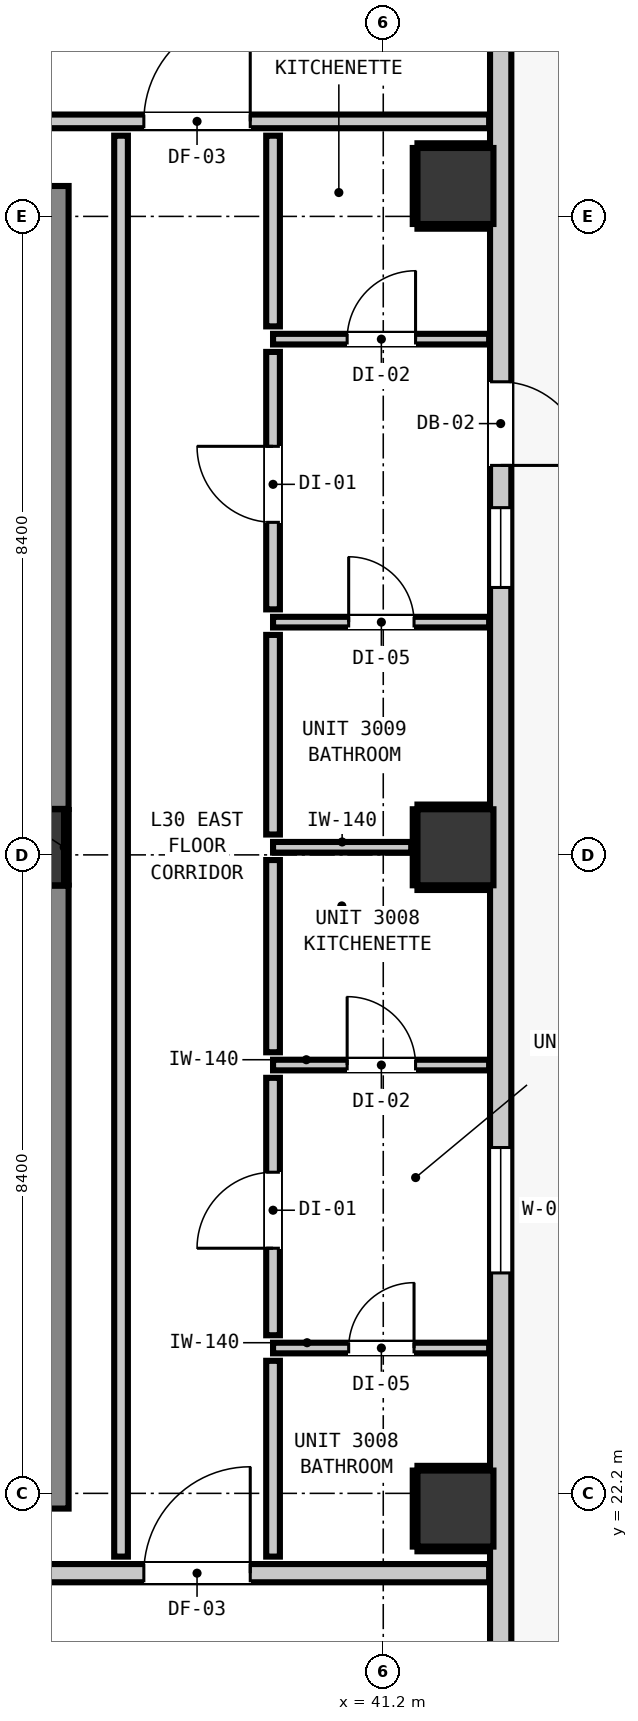
"""IFC4 building model, lengths in metres.
Left out: names, types, materials, properties, quantities, classifications, styles, units other than length and angle.
Written with IfcOpenShell. Run it as: python <this file> out.ifc"""

import sys

from ifc_helpers import new_model, si_unit, direction, frame, frame_2d, origin, origin_2d, place, context, subcontext, project, spatial, rectangle, extrude, element, fill, save


model = new_model("IFC4")
c1 = context("Model", 3, precision=1e-05, world=origin(), true_north=direction((0.0, 1.0)))
c2 = subcontext(c1, "Body", "Model", "MODEL_VIEW")
j1 = project(units=[si_unit("LENGTHUNIT", "METRE"), si_unit("PLANEANGLEUNIT", "RADIAN")], contexts=[c1])
p1 = place(None, origin())
s1 = spatial("IfcSite", under=j1, at=p1, CompositionType="ELEMENT")
p2 = place(p1, origin())
s2 = spatial("IfcBuilding", under=s1, at=p2, CompositionType="ELEMENT")
p3 = place(p2, frame((0.0, 0.0, 106.08)))
s3 = spatial("IfcBuildingStorey", under=s2, at=p3, CompositionType="ELEMENT", Elevation=106.08)
p4 = place(p3, frame((36.5, 30.7, 0.0), z_axis=(0.0, 0.0, 1.0), x_axis=(1.0, 0.0, 0.0)))
e1 = element("IfcColumn", 1, at=p4, inside=s3, PredefinedType="COLUMN", context=c2, shape_type="SweptSolid", body=[
    extrude(rectangle(XDim=1.0, YDim=1.0, at=origin_2d()), origin(), (0.0, 0.0, 1.0), 3.32),
])
p5 = place(p3, frame((36.56, 22.0, 0.0), z_axis=(0.0, 0.0, 1.0), x_axis=(0.0, 1.0, 0.0)))
e2 = element("IfcWall", 2, at=p5, inside=s3, PredefinedType="SHEAR", context=c2, shape_type="SweptSolid", body=[
    extrude(rectangle(XDim=8.195, YDim=1.0, at=frame_2d((4.098, 0.0))), origin(), (0.0, 0.0, 1.0), 3.32),
])
p6 = place(p3, frame((36.56, 31.205, 0.0), z_axis=(0.0, 0.0, 1.0), x_axis=(0.0, 1.0, 0.0)))
e3 = element("IfcWall", 3, at=p6, inside=s3, PredefinedType="SHEAR", context=c2, shape_type="SweptSolid", body=[
    extrude(rectangle(XDim=8.195, YDim=1.0, at=frame_2d((4.097, 0.0))), origin(), (0.0, 0.0, 1.0), 3.32),
])
for number, where, z_axis, x_axis in (
    (4, (42.15, 22.0, -0.2), (0.0, 0.0, 1.0), (1.0, 0.0, 0.0)),
    (5, (42.15, 30.7, -0.2), (0.0, 0.0, 1.0), (1.0, 0.0, 0.0)),
    (6, (42.15, 39.4, -0.2), (0.0, 0.0, 1.0), (1.0, 0.0, 0.0)),
):
    element("IfcColumn", number, at=place(p3, frame(where, z_axis=z_axis, x_axis=x_axis)), inside=s3, PredefinedType="COLUMN", context=c2, shape_type="SweptSolid", body=[
        extrude(rectangle(XDim=1.0, YDim=1.0, at=origin_2d()), origin(), (0.0, 0.0, 1.0), 3.52),
    ])
p7 = place(p3, frame((42.745, 43.645, 0.0), z_axis=(0.0, 0.0, 1.0), x_axis=(0.0, -1.0, 0.0)))
e7 = element("IfcWall", 7, at=p7, inside=s3, PredefinedType="STANDARD", context=c2, shape_type="SweptSolid", body=[
    extrude(rectangle(XDim=32.29, YDim=0.28, at=frame_2d((16.145, 0.0))), origin(), (0.0, 0.0, 1.0), 3.08),
])
p8 = place(p7, frame((6.821, 0.0, 0.0)))
e8 = element("IfcOpeningElement", 8, at=p8, cuts=e7, PredefinedType="OPENING", context=c2, shape_type="SweptSolid", body=[
    extrude(rectangle(XDim=1.1, YDim=2.15, at=frame_2d((0.55, 1.075))), frame((0.0, 0.15, 0.0), z_axis=(0.0, -1.0, 0.0), x_axis=(1.0, 0.0, 0.0)), (0.0, 0.0, 1.0), 0.3),
])
p9 = place(p7, frame((0.318, 0.0, 0.85)))
e9 = element("IfcOpeningElement", 9, at=p9, cuts=e7, PredefinedType="OPENING", context=c2, shape_type="SweptSolid", body=[
    extrude(rectangle(XDim=1.05, YDim=1.65, at=frame_2d((0.525, 0.825))), frame((0.0, 0.15, 0.0), z_axis=(0.0, -1.0, 0.0), x_axis=(1.0, 0.0, 0.0)), (0.0, 0.0, 1.0), 0.3),
])
p10 = place(p7, frame((16.895, 0.0, 0.85)))
e10 = element("IfcOpeningElement", 10, at=p10, cuts=e7, PredefinedType="OPENING", context=c2, shape_type="SweptSolid", body=[
    extrude(rectangle(XDim=1.65, YDim=1.75, at=frame_2d((0.825, 0.875))), frame((0.0, 0.15, 0.0), z_axis=(0.0, -1.0, 0.0), x_axis=(1.0, 0.0, 0.0)), (0.0, 0.0, 1.0), 0.3),
])
p11 = place(p7, frame((8.477, 0.0, 0.85)))
e11 = element("IfcOpeningElement", 11, at=p11, cuts=e7, PredefinedType="OPENING", context=c2, shape_type="SweptSolid", body=[
    extrude(rectangle(XDim=1.05, YDim=1.65, at=frame_2d((0.525, 0.825))), frame((0.0, 0.15, 0.0), z_axis=(0.0, -1.0, 0.0), x_axis=(1.0, 0.0, 0.0)), (0.0, 0.0, 1.0), 0.3),
])
p12 = place(p3, frame((3.207, 21.15, 0.0), z_axis=(0.0, 0.0, 1.0), x_axis=(1.0, 0.0, 0.0)))
e12 = element("IfcWall", 12, at=p12, inside=s3, PredefinedType="PARTITIONING", context=c2, shape_type="SweptSolid", body=[
    extrude(rectangle(XDim=39.386, YDim=0.24, at=frame_2d((19.693, 0.0))), origin(), (0.0, 0.0, 1.0), 3.08),
])
p13 = place(p12, frame((15.003, 0.0, 0.0)))
e13 = element("IfcOpeningElement", 13, at=p13, cuts=e12, PredefinedType="OPENING", context=c2, shape_type="SweptSolid", body=[
    extrude(rectangle(XDim=1.1, YDim=2.15, at=frame_2d((0.55, 1.075))), frame((0.0, 0.13, 0.0), z_axis=(0.0, -1.0, 0.0), x_axis=(1.0, 0.0, 0.0)), (0.0, 0.0, 1.0), 0.26),
])
p14 = place(p12, frame((7.243, 0.0, 0.0)))
e14 = element("IfcOpeningElement", 14, at=p14, cuts=e12, PredefinedType="OPENING", context=c2, shape_type="SweptSolid", body=[
    extrude(rectangle(XDim=1.4, YDim=2.15, at=frame_2d((0.7, 1.075))), frame((0.0, 0.13, 0.0), z_axis=(0.0, -1.0, 0.0), x_axis=(1.0, 0.0, 0.0)), (0.0, 0.0, 1.0), 0.26),
])
p15 = place(p12, frame((34.843, 0.0, 0.0)))
e15 = element("IfcOpeningElement", 15, at=p15, cuts=e12, PredefinedType="OPENING", context=c2, shape_type="SweptSolid", body=[
    extrude(rectangle(XDim=1.4, YDim=2.15, at=frame_2d((0.7, 1.075))), frame((0.0, 0.13, 0.0), z_axis=(0.0, -1.0, 0.0), x_axis=(1.0, 0.0, 0.0)), (0.0, 0.0, 1.0), 0.26),
])
p16 = place(p3, frame((12.979, 40.25, 0.0), z_axis=(0.0, 0.0, 1.0), x_axis=(1.0, 0.0, 0.0)))
e16 = element("IfcWall", 16, at=p16, inside=s3, PredefinedType="PARTITIONING", context=c2, shape_type="SweptSolid", body=[
    extrude(rectangle(XDim=29.614, YDim=0.18, at=frame_2d((14.807, 0.0))), origin(), (0.0, 0.0, 1.0), 3.08),
])
p17 = place(p16, frame((4.456, 0.0, 0.0)))
e17 = element("IfcOpeningElement", 17, at=p17, cuts=e16, PredefinedType="OPENING", context=c2, shape_type="SweptSolid", body=[
    extrude(rectangle(XDim=1.4, YDim=2.15, at=frame_2d((0.7, 1.075))), frame((0.0, 0.1, 0.0), z_axis=(0.0, -1.0, 0.0), x_axis=(1.0, 0.0, 0.0)), (0.0, 0.0, 1.0), 0.2),
])
p18 = place(p16, frame((25.071, 0.0, 0.0)))
e18 = element("IfcOpeningElement", 18, at=p18, cuts=e16, PredefinedType="OPENING", context=c2, shape_type="SweptSolid", body=[
    extrude(rectangle(XDim=1.4, YDim=2.15, at=frame_2d((0.7, 1.075))), frame((0.0, 0.1, 0.0), z_axis=(0.0, -1.0, 0.0), x_axis=(1.0, 0.0, 0.0)), (0.0, 0.0, 1.0), 0.2),
])
p19 = place(p3, frame((39.75, 24.112, 0.0), z_axis=(0.0, 0.0, 1.0), x_axis=(1.0, 0.0, 0.0)))
e19 = element("IfcWall", 19, at=p19, inside=s3, PredefinedType="PARTITIONING", context=c2, shape_type="SweptSolid", body=[
    extrude(rectangle(XDim=2.843, YDim=0.14, at=frame_2d((1.421, 0.0))), origin(), (0.0, 0.0, 1.0), 3.08),
])
p20 = place(p19, frame((0.995, 0.0, 0.0)))
e20 = element("IfcOpeningElement", 20, at=p20, cuts=e19, PredefinedType="OPENING", context=c2, shape_type="SweptSolid", body=[
    extrude(rectangle(XDim=0.86, YDim=2.02, at=frame_2d((0.43, 1.01))), frame((0.0, 0.08, 0.0), z_axis=(0.0, -1.0, 0.0), x_axis=(1.0, 0.0, 0.0)), (0.0, 0.0, 1.0), 0.16),
])
p21 = place(p3, frame((39.75, 27.835, 0.0), z_axis=(0.0, 0.0, 1.0), x_axis=(1.0, 0.0, 0.0)))
e21 = element("IfcWall", 21, at=p21, inside=s3, PredefinedType="PARTITIONING", context=c2, shape_type="SweptSolid", body=[
    extrude(rectangle(XDim=2.843, YDim=0.14, at=frame_2d((1.421, 0.0))), origin(), (0.0, 0.0, 1.0), 3.08),
])
p22 = place(p21, frame((0.975, 0.0, 0.0)))
e22 = element("IfcOpeningElement", 22, at=p22, cuts=e21, PredefinedType="OPENING", context=c2, shape_type="SweptSolid", body=[
    extrude(rectangle(XDim=0.9, YDim=2.1, at=frame_2d((0.45, 1.05))), frame((0.0, 0.08, 0.0), z_axis=(0.0, -1.0, 0.0), x_axis=(1.0, 0.0, 0.0)), (0.0, 0.0, 1.0), 0.16),
])
p23 = place(p3, frame((39.75, 30.7, 0.0), z_axis=(0.0, 0.0, 1.0), x_axis=(1.0, 0.0, 0.0)))
e23 = element("IfcWall", 23, at=p23, inside=s3, PredefinedType="PARTITIONING", context=c2, shape_type="SweptSolid", body=[
    extrude(rectangle(XDim=1.818, YDim=0.14, at=frame_2d((0.909, 0.0))), origin(), (0.0, 0.0, 1.0), 2.315),
])
p24 = place(p3, frame((39.75, 33.662, 0.0), z_axis=(0.0, 0.0, 1.0), x_axis=(1.0, 0.0, 0.0)))
e24 = element("IfcWall", 24, at=p24, inside=s3, PredefinedType="PARTITIONING", context=c2, shape_type="SweptSolid", body=[
    extrude(rectangle(XDim=2.843, YDim=0.14, at=frame_2d((1.421, 0.0))), origin(), (0.0, 0.0, 1.0), 3.08),
])
p25 = place(p24, frame((0.995, 0.0, 0.0)))
e25 = element("IfcOpeningElement", 25, at=p25, cuts=e24, PredefinedType="OPENING", context=c2, shape_type="SweptSolid", body=[
    extrude(rectangle(XDim=0.86, YDim=2.02, at=frame_2d((0.43, 1.01))), frame((0.0, 0.08, 0.0), z_axis=(0.0, -1.0, 0.0), x_axis=(1.0, 0.0, 0.0)), (0.0, 0.0, 1.0), 0.16),
])
p26 = place(p3, frame((39.75, 37.385, 0.0), z_axis=(0.0, 0.0, 1.0), x_axis=(1.0, 0.0, 0.0)))
e26 = element("IfcWall", 26, at=p26, inside=s3, PredefinedType="PARTITIONING", context=c2, shape_type="SweptSolid", body=[
    extrude(rectangle(XDim=2.843, YDim=0.14, at=frame_2d((1.421, 0.0))), origin(), (0.0, 0.0, 1.0), 3.08),
])
p27 = place(p26, frame((0.975, 0.0, 0.0)))
e27 = element("IfcOpeningElement", 27, at=p27, cuts=e26, PredefinedType="OPENING", context=c2, shape_type="SweptSolid", body=[
    extrude(rectangle(XDim=0.9, YDim=2.1, at=frame_2d((0.45, 1.05))), frame((0.0, 0.08, 0.0), z_axis=(0.0, -1.0, 0.0), x_axis=(1.0, 0.0, 0.0)), (0.0, 0.0, 1.0), 0.16),
])
p28 = place(p3, frame((37.75, 21.368, 0.0), z_axis=(0.0, 0.0, 1.0), x_axis=(0.0, 1.0, 0.0)))
e28 = element("IfcWall", 28, at=p28, inside=s3, PredefinedType="PARTITIONING", context=c2, shape_type="SweptSolid", body=[
    extrude(rectangle(XDim=18.694, YDim=0.18, at=frame_2d((9.347, 0.0))), origin(), (0.0, 0.0, 1.0), 3.08),
])
p29 = place(p3, frame((39.75, 21.368, 0.0), z_axis=(0.0, 0.0, 1.0), x_axis=(0.0, 1.0, 0.0)))
e29 = element("IfcWall", 29, at=p29, inside=s3, PredefinedType="PARTITIONING", context=c2, shape_type="SweptSolid", body=[
    extrude(rectangle(XDim=2.576, YDim=0.18, at=frame_2d((1.288, 0.0))), origin(), (0.0, 0.0, 1.0), 3.08),
])
p30 = place(p3, frame((39.75, 24.28, 0.0), z_axis=(0.0, 0.0, 1.0), x_axis=(0.0, 1.0, 0.0)))
e30 = element("IfcWall", 30, at=p30, inside=s3, PredefinedType="PARTITIONING", context=c2, shape_type="SweptSolid", body=[
    extrude(rectangle(XDim=3.387, YDim=0.18, at=frame_2d((1.693, 0.0))), origin(), (0.0, 0.0, 1.0), 3.08),
])
p31 = place(p30, frame((1.145, 0.0, 0.0)))
e31 = element("IfcOpeningElement", 31, at=p31, cuts=e30, PredefinedType="OPENING", context=c2, shape_type="SweptSolid", body=[
    extrude(rectangle(XDim=1.0, YDim=2.15, at=frame_2d((0.5, 1.075))), frame((0.0, 0.1, 0.0), z_axis=(0.0, -1.0, 0.0), x_axis=(1.0, 0.0, 0.0)), (0.0, 0.0, 1.0), 0.2),
])
p32 = place(p3, frame((39.75, 28.003, 0.0), z_axis=(0.0, 0.0, 1.0), x_axis=(0.0, 1.0, 0.0)))
e32 = element("IfcWall", 32, at=p32, inside=s3, PredefinedType="PARTITIONING", context=c2, shape_type="SweptSolid", body=[
    extrude(rectangle(XDim=2.529, YDim=0.18, at=frame_2d((1.265, 0.0))), origin(), (0.0, 0.0, 1.0), 3.08),
])
p33 = place(p3, frame((39.75, 30.868, 0.0), z_axis=(0.0, 0.0, 1.0), x_axis=(0.0, 1.0, 0.0)))
e33 = element("IfcWall", 33, at=p33, inside=s3, PredefinedType="PARTITIONING", context=c2, shape_type="SweptSolid", body=[
    extrude(rectangle(XDim=2.626, YDim=0.18, at=frame_2d((1.313, 0.0))), origin(), (0.0, 0.0, 1.0), 3.08),
])
p34 = place(p3, frame((39.75, 33.83, 0.0), z_axis=(0.0, 0.0, 1.0), x_axis=(0.0, 1.0, 0.0)))
e34 = element("IfcWall", 34, at=p34, inside=s3, PredefinedType="PARTITIONING", context=c2, shape_type="SweptSolid", body=[
    extrude(rectangle(XDim=3.387, YDim=0.18, at=frame_2d((1.693, 0.0))), origin(), (0.0, 0.0, 1.0), 3.08),
])
p35 = place(p34, frame((1.145, 0.0, 0.0)))
e35 = element("IfcOpeningElement", 35, at=p35, cuts=e34, PredefinedType="OPENING", context=c2, shape_type="SweptSolid", body=[
    extrude(rectangle(XDim=1.0, YDim=2.15, at=frame_2d((0.5, 1.075))), frame((0.0, 0.1, 0.0), z_axis=(0.0, -1.0, 0.0), x_axis=(1.0, 0.0, 0.0)), (0.0, 0.0, 1.0), 0.2),
])
p36 = place(p3, frame((39.75, 37.553, 0.0), z_axis=(0.0, 0.0, 1.0), x_axis=(0.0, 1.0, 0.0)))
e36 = element("IfcWall", 36, at=p36, inside=s3, PredefinedType="PARTITIONING", context=c2, shape_type="SweptSolid", body=[
    extrude(rectangle(XDim=2.509, YDim=0.18, at=frame_2d((1.254, 0.0))), origin(), (0.0, 0.0, 1.0), 3.08),
])
p37 = place(p3, frame((37.032, 30.21, 0.0), z_axis=(0.0, 0.0, 1.0), x_axis=(0.0, 1.0, 0.0)))
e37 = element("IfcWall", 37, at=p37, inside=s3, PredefinedType="PARTITIONING", context=c2, shape_type="SweptSolid", body=[
    extrude(rectangle(XDim=0.98, YDim=0.06, at=frame_2d((0.49, 0.0))), origin(), (0.0, 0.0, 1.0), 1.45),
])
for number, where, z_axis, x_axis in (
    (38, (41.65, 21.468, 0.0), (0.0, 0.0, 1.0), (1.0, 0.0, 0.0)),
    (39, (41.65, 22.532, 0.0), (0.0, 0.0, 1.0), (1.0, 0.0, 0.0)),
):
    element("IfcWall", number, at=place(p3, frame(where, z_axis=z_axis, x_axis=x_axis)), inside=s3, PredefinedType="PARTITIONING", context=c2, shape_type="SweptSolid", body=[
        extrude(rectangle(XDim=0.94, YDim=0.06, at=frame_2d((0.47, 0.0))), origin(), (0.0, 0.0, 1.0), 1.45),
    ])
p38 = place(p3, frame((41.618, 21.5, 0.0), z_axis=(0.0, 0.0, 1.0), x_axis=(0.0, 1.0, 0.0)))
e40 = element("IfcWall", 40, at=p38, inside=s3, PredefinedType="PARTITIONING", context=c2, shape_type="SweptSolid", body=[
    extrude(rectangle(XDim=1.0, YDim=0.06, at=frame_2d((0.5, 0.0))), origin(), (0.0, 0.0, 1.0), 1.45),
])
for number, where, z_axis, x_axis in (
    (41, (41.65, 30.168, 0.0), (0.0, 0.0, 1.0), (1.0, 0.0, 0.0)),
    (42, (41.65, 31.232, 0.0), (0.0, 0.0, 1.0), (1.0, 0.0, 0.0)),
):
    element("IfcWall", number, at=place(p3, frame(where, z_axis=z_axis, x_axis=x_axis)), inside=s3, PredefinedType="PARTITIONING", context=c2, shape_type="SweptSolid", body=[
        extrude(rectangle(XDim=0.94, YDim=0.06, at=frame_2d((0.47, 0.0))), origin(), (0.0, 0.0, 1.0), 1.45),
    ])
p39 = place(p3, frame((41.618, 30.2, 0.0), z_axis=(0.0, 0.0, 1.0), x_axis=(0.0, 1.0, 0.0)))
e43 = element("IfcWall", 43, at=p39, inside=s3, PredefinedType="PARTITIONING", context=c2, shape_type="SweptSolid", body=[
    extrude(rectangle(XDim=1.0, YDim=0.06, at=frame_2d((0.5, 0.0))), origin(), (0.0, 0.0, 1.0), 1.45),
])
for number, where, z_axis, x_axis in (
    (44, (41.65, 38.868, 0.0), (0.0, 0.0, 1.0), (1.0, 0.0, 0.0)),
    (45, (41.65, 39.932, 0.0), (0.0, 0.0, 1.0), (1.0, 0.0, 0.0)),
):
    element("IfcWall", number, at=place(p3, frame(where, z_axis=z_axis, x_axis=x_axis)), inside=s3, PredefinedType="PARTITIONING", context=c2, shape_type="SweptSolid", body=[
        extrude(rectangle(XDim=0.94, YDim=0.06, at=frame_2d((0.47, 0.0))), origin(), (0.0, 0.0, 1.0), 1.45),
    ])
p40 = place(p3, frame((41.618, 38.9, 0.0), z_axis=(0.0, 0.0, 1.0), x_axis=(0.0, 1.0, 0.0)))
e46 = element("IfcWall", 46, at=p40, inside=s3, PredefinedType="PARTITIONING", context=c2, shape_type="SweptSolid", body=[
    extrude(rectangle(XDim=1.0, YDim=0.06, at=frame_2d((0.5, 0.0))), origin(), (0.0, 0.0, 1.0), 1.45),
])
p41 = place(p8, origin())
e47 = element("IfcDoor", 47, at=p41, inside=s3, OperationType="SINGLE_SWING_RIGHT", PredefinedType="DOOR", context=c2, shape_type="SweptSolid", body=[
    extrude(rectangle(XDim=1.1, YDim=2.15, at=frame_2d((0.55, 1.075))), frame((0.0, 0.025, 0.0), z_axis=(0.0, -1.0, 0.0), x_axis=(1.0, 0.0, 0.0)), (0.0, 0.0, 1.0), 0.05),
])
fill(e8, e47)
p42 = place(p10, origin())
e48 = element("IfcWindow", 48, at=p42, inside=s3, PartitioningType="SINGLE_PANEL", PredefinedType="WINDOW", context=c2, shape_type="SweptSolid", body=[
    extrude(rectangle(XDim=1.65, YDim=1.75, at=frame_2d((0.825, 0.875))), frame((0.0, 0.03, 0.0), z_axis=(0.0, -1.0, 0.0), x_axis=(1.0, 0.0, 0.0)), (0.0, 0.0, 1.0), 0.06),
])
fill(e10, e48)
p43 = place(p11, origin())
e49 = element("IfcWindow", 49, at=p43, inside=s3, PartitioningType="SINGLE_PANEL", PredefinedType="WINDOW", context=c2, shape_type="SweptSolid", body=[
    extrude(rectangle(XDim=1.05, YDim=1.65, at=frame_2d((0.525, 0.825))), frame((0.0, 0.03, 0.0), z_axis=(0.0, -1.0, 0.0), x_axis=(1.0, 0.0, 0.0)), (0.0, 0.0, 1.0), 0.06),
])
fill(e11, e49)
p44 = place(p15, origin())
e50 = element("IfcDoor", 50, at=p44, inside=s3, OperationType="SINGLE_SWING_RIGHT", PredefinedType="DOOR", context=c2, shape_type="SweptSolid", body=[
    extrude(rectangle(XDim=1.4, YDim=2.15, at=frame_2d((0.7, 1.075))), frame((0.0, 0.025, 0.0), z_axis=(0.0, -1.0, 0.0), x_axis=(1.0, 0.0, 0.0)), (0.0, 0.0, 1.0), 0.05),
])
fill(e15, e50)
p45 = place(p18, origin())
e51 = element("IfcDoor", 51, at=p45, inside=s3, OperationType="SINGLE_SWING_RIGHT", PredefinedType="DOOR", context=c2, shape_type="SweptSolid", body=[
    extrude(rectangle(XDim=1.4, YDim=2.15, at=frame_2d((0.7, 1.075))), frame((0.0, 0.025, 0.0), z_axis=(0.0, -1.0, 0.0), x_axis=(1.0, 0.0, 0.0)), (0.0, 0.0, 1.0), 0.05),
])
fill(e18, e51)
p46 = place(p31, origin())
e52 = element("IfcDoor", 52, at=p46, inside=s3, OperationType="SINGLE_SWING_LEFT", PredefinedType="DOOR", context=c2, shape_type="SweptSolid", body=[
    extrude(rectangle(XDim=1.0, YDim=2.15, at=frame_2d((0.5, 1.075))), frame((0.0, 0.025, 0.0), z_axis=(0.0, -1.0, 0.0), x_axis=(1.0, 0.0, 0.0)), (0.0, 0.0, 1.0), 0.05),
])
fill(e31, e52)
p47 = place(p20, origin())
e53 = element("IfcDoor", 53, at=p47, inside=s3, OperationType="SINGLE_SWING_RIGHT", PredefinedType="DOOR", context=c2, shape_type="SweptSolid", body=[
    extrude(rectangle(XDim=0.86, YDim=2.02, at=frame_2d((0.43, 1.01))), frame((0.0, 0.025, 0.0), z_axis=(0.0, -1.0, 0.0), x_axis=(1.0, 0.0, 0.0)), (0.0, 0.0, 1.0), 0.05),
])
fill(e20, e53)
p48 = place(p22, origin())
e54 = element("IfcDoor", 54, at=p48, inside=s3, OperationType="SINGLE_SWING_LEFT", PredefinedType="DOOR", context=c2, shape_type="SweptSolid", body=[
    extrude(rectangle(XDim=0.9, YDim=2.1, at=frame_2d((0.45, 1.05))), frame((0.0, 0.025, 0.0), z_axis=(0.0, -1.0, 0.0), x_axis=(1.0, 0.0, 0.0)), (0.0, 0.0, 1.0), 0.05),
])
fill(e22, e54)
p49 = place(p35, origin())
e55 = element("IfcDoor", 55, at=p49, inside=s3, OperationType="SINGLE_SWING_RIGHT", PredefinedType="DOOR", context=c2, shape_type="SweptSolid", body=[
    extrude(rectangle(XDim=1.0, YDim=2.15, at=frame_2d((0.5, 1.075))), frame((0.0, 0.025, 0.0), z_axis=(0.0, -1.0, 0.0), x_axis=(1.0, 0.0, 0.0)), (0.0, 0.0, 1.0), 0.05),
])
fill(e35, e55)
p50 = place(p25, origin())
e56 = element("IfcDoor", 56, at=p50, inside=s3, OperationType="SINGLE_SWING_LEFT", PredefinedType="DOOR", context=c2, shape_type="SweptSolid", body=[
    extrude(rectangle(XDim=0.86, YDim=2.02, at=frame_2d((0.43, 1.01))), frame((0.0, 0.025, 0.0), z_axis=(0.0, -1.0, 0.0), x_axis=(1.0, 0.0, 0.0)), (0.0, 0.0, 1.0), 0.05),
])
fill(e25, e56)
p51 = place(p27, origin())
e57 = element("IfcDoor", 57, at=p51, inside=s3, OperationType="SINGLE_SWING_RIGHT", PredefinedType="DOOR", context=c2, shape_type="SweptSolid", body=[
    extrude(rectangle(XDim=0.9, YDim=2.1, at=frame_2d((0.45, 1.05))), frame((0.0, 0.025, 0.0), z_axis=(0.0, -1.0, 0.0), x_axis=(1.0, 0.0, 0.0)), (0.0, 0.0, 1.0), 0.05),
])
fill(e27, e57)
save(model, sys.argv[1])
